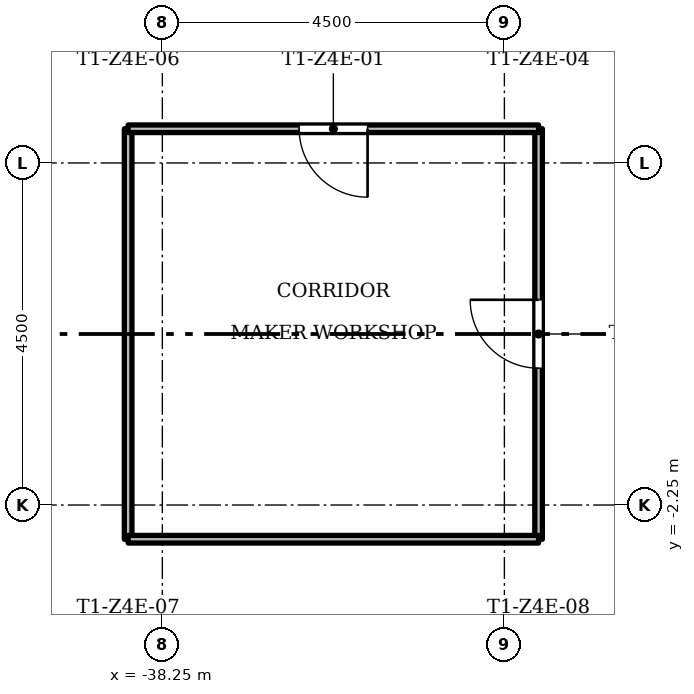
"""IFC4 building model, lengths in metres.
Left out: names, types, materials, properties, quantities, classifications, styles, units other than length and angle.
Written with IfcOpenShell. Run it as: python <this file> out.ifc"""

import sys

from ifc_helpers import new_model, si_unit, direction, frame, frame_2d, origin, place, context, subcontext, project, spatial, rectangle, extrude, element, fill, save


model = new_model("IFC4")
c1 = context("Model", 3, precision=1e-05, world=origin(), true_north=direction((0.0, 1.0)))
c2 = subcontext(c1, "Body", "Model", "MODEL_VIEW")
j1 = project(units=[si_unit("LENGTHUNIT", "METRE"), si_unit("PLANEANGLEUNIT", "RADIAN")], contexts=[c1])
p1 = place(None, origin())
s1 = spatial("IfcSite", under=j1, at=p1, CompositionType="ELEMENT")
p2 = place(p1, origin())
s2 = spatial("IfcBuilding", under=s1, at=p2, CompositionType="ELEMENT")
p3 = place(p2, frame((0.0, 0.0, 213.0)))
s3 = spatial("IfcBuildingStorey", under=s2, at=p3, CompositionType="ELEMENT", Elevation=213.0)
p4 = place(p3, frame((-38.7, -2.7, 0.0), z_axis=(0.0, 0.0, 1.0), x_axis=(0.0, 1.0, 0.0)))
e1 = element("IfcWall", 1, at=p4, inside=s3, PredefinedType="PARTITIONING", context=c2, shape_type="SweptSolid", body=[
    extrude(rectangle(XDim=5.4, YDim=0.1, at=frame_2d((2.7, 0.0))), origin(), (0.0, 0.0, 1.0), 3.0),
])
p5 = place(p3, frame((-33.3, -2.7, 0.0), z_axis=(0.0, 0.0, 1.0), x_axis=(0.0, 1.0, 0.0)))
e2 = element("IfcWall", 2, at=p5, inside=s3, PredefinedType="PARTITIONING", context=c2, shape_type="SweptSolid", body=[
    extrude(rectangle(XDim=5.4, YDim=0.1, at=frame_2d((2.7, 0.0))), origin(), (0.0, 0.0, 1.0), 3.0),
])
p6 = place(p5, frame((2.25, 0.0, 0.0)))
e3 = element("IfcOpeningElement", 3, at=p6, cuts=e2, PredefinedType="OPENING", context=c2, shape_type="SweptSolid", body=[
    extrude(rectangle(XDim=0.9, YDim=2.1, at=frame_2d((0.45, 1.05))), frame((0.0, 0.06, 0.0), z_axis=(0.0, -1.0, 0.0), x_axis=(1.0, 0.0, 0.0)), (0.0, 0.0, 1.0), 0.12),
])
p7 = place(p3, frame((-38.7, -2.7, 0.0), z_axis=(0.0, 0.0, 1.0), x_axis=(1.0, 0.0, 0.0)))
e4 = element("IfcWall", 4, at=p7, inside=s3, PredefinedType="PARTITIONING", context=c2, shape_type="SweptSolid", body=[
    extrude(rectangle(XDim=5.4, YDim=0.1, at=frame_2d((2.7, 0.0))), origin(), (0.0, 0.0, 1.0), 3.0),
])
p8 = place(p3, frame((-38.7, 2.7, 0.0), z_axis=(0.0, 0.0, 1.0), x_axis=(1.0, 0.0, 0.0)))
e5 = element("IfcWall", 5, at=p8, inside=s3, PredefinedType="PARTITIONING", context=c2, shape_type="SweptSolid", body=[
    extrude(rectangle(XDim=5.4, YDim=0.1, at=frame_2d((2.7, 0.0))), origin(), (0.0, 0.0, 1.0), 3.0),
])
p9 = place(p8, frame((2.25, 0.0, 0.0)))
e6 = element("IfcOpeningElement", 6, at=p9, cuts=e5, PredefinedType="OPENING", context=c2, shape_type="SweptSolid", body=[
    extrude(rectangle(XDim=0.9, YDim=2.1, at=frame_2d((0.45, 1.05))), frame((0.0, 0.06, 0.0), z_axis=(0.0, -1.0, 0.0), x_axis=(1.0, 0.0, 0.0)), (0.0, 0.0, 1.0), 0.12),
])
p10 = place(p9, origin())
e7 = element("IfcDoor", 7, at=p10, inside=s3, OperationType="SINGLE_SWING_RIGHT", PredefinedType="DOOR", context=c2, shape_type="SweptSolid", body=[
    extrude(rectangle(XDim=0.9, YDim=2.1, at=frame_2d((0.45, 1.05))), frame((0.0, 0.025, 0.0), z_axis=(0.0, -1.0, 0.0), x_axis=(1.0, 0.0, 0.0)), (0.0, 0.0, 1.0), 0.05),
])
fill(e6, e7)
p11 = place(p6, origin())
e8 = element("IfcDoor", 8, at=p11, inside=s3, OperationType="SINGLE_SWING_LEFT", PredefinedType="DOOR", context=c2, shape_type="SweptSolid", body=[
    extrude(rectangle(XDim=0.9, YDim=2.1, at=frame_2d((0.45, 1.05))), frame((0.0, 0.025, 0.0), z_axis=(0.0, -1.0, 0.0), x_axis=(1.0, 0.0, 0.0)), (0.0, 0.0, 1.0), 0.05),
])
fill(e3, e8)
save(model, sys.argv[1])
